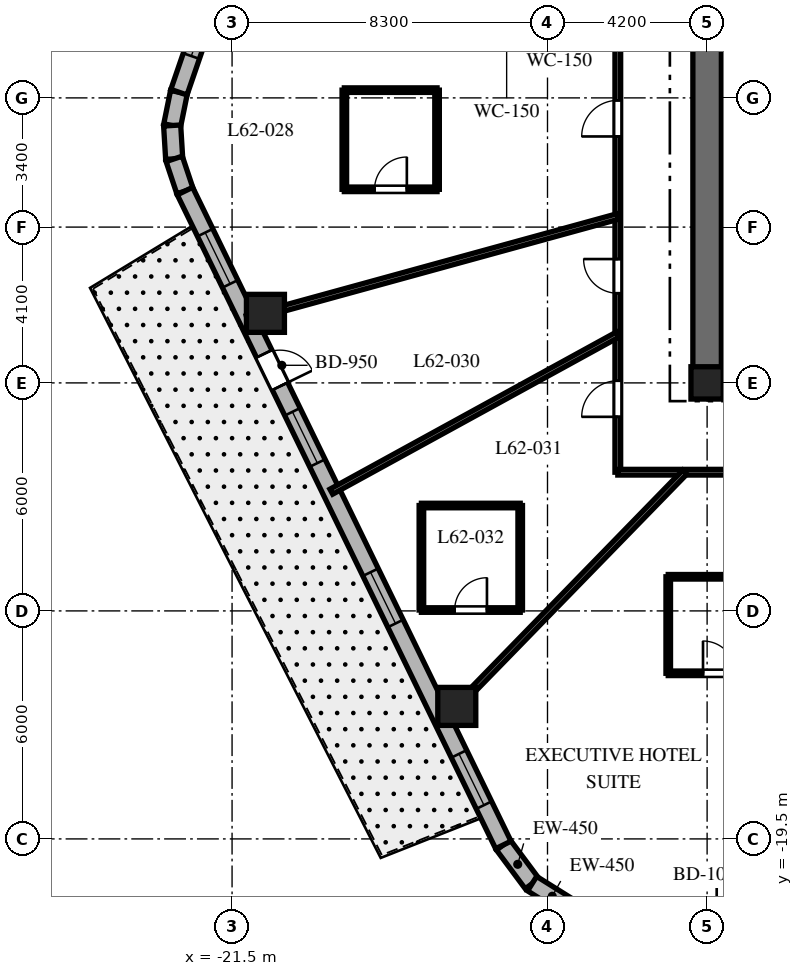
"""IFC4 building model, lengths in metres.
Left out: names, types, materials, properties, quantities, classifications, styles, units other than length and angle.
Written with IfcOpenShell. Run it as: python <this file> out.ifc"""

import sys

from ifc_helpers import new_model, si_unit, direction, frame, frame_2d, origin, origin_2d, place, context, subcontext, project, spatial, rectangle, extrude, element, fill, save


model = new_model("IFC4")
c1 = context("Model", 3, precision=1e-05, world=origin(), true_north=direction((0.0, 1.0)))
c2 = subcontext(c1, "Body", "Model", "MODEL_VIEW")
j1 = project(units=[si_unit("LENGTHUNIT", "METRE"), si_unit("PLANEANGLEUNIT", "RADIAN")], contexts=[c1])
p1 = place(None, origin())
s1 = spatial("IfcSite", under=j1, at=p1, CompositionType="ELEMENT")
p2 = place(p1, origin())
s2 = spatial("IfcBuilding", under=s1, at=p2, CompositionType="ELEMENT")
p3 = place(p2, frame((0.0, 0.0, 248.3)))
s3 = spatial("IfcBuildingStorey", under=s2, at=p3, CompositionType="ELEMENT", Elevation=248.3)
p4 = place(p3, frame((-9.375, -7.5, 0.0), z_axis=(0.0, 0.0, 1.0), x_axis=(1.0, 0.0, 0.0)))
e1 = element("IfcWall", 1, at=p4, inside=s3, PredefinedType="SHEAR", context=c2, shape_type="SweptSolid", body=[
    extrude(rectangle(XDim=18.75, YDim=0.75, at=frame_2d((9.375, 0.0))), origin(), (0.0, 0.0, 1.0), 3.8),
])
p5 = place(p4, frame((9.425, 0.0, 0.0)))
e2 = element("IfcOpeningElement", 2, at=p5, cuts=e1, PredefinedType="OPENING", context=c2, shape_type="SweptSolid", body=[
    extrude(rectangle(XDim=1.0, YDim=2.15, at=frame_2d((0.5, 1.075))), frame((0.0, 0.385, 0.0), z_axis=(0.0, -1.0, 0.0), x_axis=(1.0, 0.0, 0.0)), (0.0, 0.0, 1.0), 0.77),
])
p6 = place(p3, frame((-9.0, -7.125, 0.0), z_axis=(0.0, 0.0, 1.0), x_axis=(0.0, 1.0, 0.0)))
e3 = element("IfcWall", 3, at=p6, inside=s3, PredefinedType="SHEAR", context=c2, shape_type="SweptSolid", body=[
    extrude(rectangle(XDim=14.25, YDim=0.75, at=frame_2d((7.125, 0.0))), origin(), (0.0, 0.0, 1.0), 3.8),
])
p7 = place(p6, frame((10.25, 0.0, 0.0)))
e4 = element("IfcOpeningElement", 4, at=p7, cuts=e3, PredefinedType="OPENING", context=c2, shape_type="SweptSolid", body=[
    extrude(rectangle(XDim=1.05, YDim=2.15, at=frame_2d((0.525, 1.075))), frame((0.0, 0.385, 0.0), z_axis=(0.0, -1.0, 0.0), x_axis=(1.0, 0.0, 0.0)), (0.0, 0.0, 1.0), 0.77),
])
p8 = place(p3, frame((-9.0, -7.5, 0.0), z_axis=(0.0, 0.0, 1.0), x_axis=(1.0, 0.0, 0.0)))
e5 = element("IfcColumn", 5, at=p8, inside=s3, PredefinedType="COLUMN", context=c2, shape_type="SweptSolid", body=[
    extrude(rectangle(XDim=0.85, YDim=0.85, at=origin_2d()), origin(), (0.0, 0.0, 1.0), 3.8),
])
for number, where, z_axis, x_axis in (
    (6, (-20.622, -5.67, 0.0), (0.0, 0.0, 1.0), (1.0, 0.0, 0.0)),
    (7, (-15.587, -16.013, 0.0), (0.0, 0.0, 1.0), (1.0, 0.0, 0.0)),
):
    element("IfcColumn", number, at=place(p3, frame(where, z_axis=z_axis, x_axis=x_axis)), inside=s3, PredefinedType="COLUMN", context=c2, shape_type="SweptSolid", body=[
        extrude(rectangle(XDim=1.0, YDim=1.0, at=origin_2d()), origin(), (0.0, 0.0, 1.0), 3.8),
    ])
p9 = place(p3, frame((-14.362, -19.658, 0.0), z_axis=(0.0, 0.0, 1.0), x_axis=(0.596642462792, -0.80250717853, 0.0)))
e8 = element("IfcWall", 8, at=p9, inside=s3, PredefinedType="SOLIDWALL", context=c2, shape_type="SweptSolid", body=[
    extrude(rectangle(XDim=1.27, YDim=0.45, at=frame_2d((0.635, 0.0))), origin(), (0.0, 0.0, 1.0), 3.5),
])
p10 = place(p3, frame((-13.604, -20.678, 0.0), z_axis=(0.0, 0.0, 1.0), x_axis=(0.847910404124, -0.53013955387, 0.0)))
e9 = element("IfcWall", 9, at=p10, inside=s3, PredefinedType="SOLIDWALL", context=c2, shape_type="SweptSolid", body=[
    extrude(rectangle(XDim=1.249, YDim=0.45, at=frame_2d((0.624, 0.0))), origin(), (0.0, 0.0, 1.0), 3.5),
])
p11 = place(p3, frame((-22.898, 0.15, 0.0), z_axis=(0.0, 0.0, 1.0), x_axis=(-0.199055826889, -0.979988151858, 0.0)))
e10 = element("IfcWall", 10, at=p11, inside=s3, PredefinedType="SOLIDWALL", context=c2, shape_type="SweptSolid", body=[
    extrude(rectangle(XDim=0.894, YDim=0.45, at=frame_2d((0.447, 0.0))), origin(), (0.0, 0.0, 1.0), 3.5),
])
p12 = place(p3, frame((-23.076, -0.727, 0.0), z_axis=(0.0, 0.0, 1.0), x_axis=(0.060805222108, -0.998149650586, 0.0)))
e11 = element("IfcWall", 11, at=p12, inside=s3, PredefinedType="SOLIDWALL", context=c2, shape_type="SweptSolid", body=[
    extrude(rectangle(XDim=0.879, YDim=0.45, at=frame_2d((0.44, 0.0))), origin(), (0.0, 0.0, 1.0), 3.5),
])
p13 = place(p3, frame((-23.023, -1.604, 0.0), z_axis=(0.0, 0.0, 1.0), x_axis=(0.316801227695, -0.948491951537, 0.0)))
e12 = element("IfcWall", 12, at=p13, inside=s3, PredefinedType="SOLIDWALL", context=c2, shape_type="SweptSolid", body=[
    extrude(rectangle(XDim=0.894, YDim=0.45, at=frame_2d((0.447, 0.0))), origin(), (0.0, 0.0, 1.0), 3.5),
])
p14 = place(p3, frame((-16.324, 19.275, 0.0), z_axis=(0.0, 0.0, 1.0), x_axis=(-0.325083142304, -0.945685439557, 0.0)))
e13 = element("IfcWall", 13, at=p14, inside=s3, PredefinedType="SOLIDWALL", context=c2, shape_type="SweptSolid", body=[
    extrude(rectangle(XDim=20.224, YDim=0.45, at=frame_2d((10.112, 0.0))), origin(), (0.0, 0.0, 1.0), 3.5),
])
p15 = place(p14, frame((0.953, 0.0, 0.8)))
e14 = element("IfcOpeningElement", 14, at=p15, cuts=e13, PredefinedType="OPENING", context=c2, shape_type="SweptSolid", body=[
    extrude(rectangle(XDim=2.1, YDim=1.85, at=frame_2d((1.05, 0.925))), frame((0.0, 0.235, 0.0), z_axis=(0.0, -1.0, 0.0), x_axis=(1.0, 0.0, 0.0)), (0.0, 0.0, 1.0), 0.47),
])
p16 = place(p14, frame((6.268, 0.0, 0.8)))
e15 = element("IfcOpeningElement", 15, at=p16, cuts=e13, PredefinedType="OPENING", context=c2, shape_type="SweptSolid", body=[
    extrude(rectangle(XDim=2.1, YDim=1.85, at=frame_2d((1.05, 0.925))), frame((0.0, 0.235, 0.0), z_axis=(0.0, -1.0, 0.0), x_axis=(1.0, 0.0, 0.0)), (0.0, 0.0, 1.0), 0.47),
])
p17 = place(p14, frame((11.95, 0.0, 0.8)))
e16 = element("IfcOpeningElement", 16, at=p17, cuts=e13, PredefinedType="OPENING", context=c2, shape_type="SweptSolid", body=[
    extrude(rectangle(XDim=2.1, YDim=1.85, at=frame_2d((1.05, 0.925))), frame((0.0, 0.235, 0.0), z_axis=(0.0, -1.0, 0.0), x_axis=(1.0, 0.0, 0.0)), (0.0, 0.0, 1.0), 0.47),
])
p18 = place(p14, frame((17.118, 0.0, 0.8)))
e17 = element("IfcOpeningElement", 17, at=p18, cuts=e13, PredefinedType="OPENING", context=c2, shape_type="SweptSolid", body=[
    extrude(rectangle(XDim=2.1, YDim=1.85, at=frame_2d((1.05, 0.925))), frame((0.0, 0.235, 0.0), z_axis=(0.0, -1.0, 0.0), x_axis=(1.0, 0.0, 0.0)), (0.0, 0.0, 1.0), 0.47),
])
p19 = place(p3, frame((-22.74, -2.452, 0.0), z_axis=(0.0, 0.0, 1.0), x_axis=(0.437753424814, -0.899095066755, 0.0)))
e18 = element("IfcWall", 18, at=p19, inside=s3, PredefinedType="SOLIDWALL", context=c2, shape_type="SweptSolid", body=[
    extrude(rectangle(XDim=19.137, YDim=0.45, at=frame_2d((9.569, 0.0))), origin(), (0.0, 0.0, 1.0), 3.5),
])
p20 = place(p19, frame((4.763, 0.0, 0.0)))
e19 = element("IfcOpeningElement", 19, at=p20, cuts=e18, PredefinedType="OPENING", context=c2, shape_type="SweptSolid", body=[
    extrude(rectangle(XDim=0.95, YDim=2.15, at=frame_2d((0.475, 1.075))), frame((0.0, 0.235, 0.0), z_axis=(0.0, -1.0, 0.0), x_axis=(1.0, 0.0, 0.0)), (0.0, 0.0, 1.0), 0.47),
])
p21 = place(p19, frame((1.216, 0.0, 0.8)))
e20 = element("IfcOpeningElement", 20, at=p21, cuts=e18, PredefinedType="OPENING", context=c2, shape_type="SweptSolid", body=[
    extrude(rectangle(XDim=1.5, YDim=1.8, at=frame_2d((0.75, 0.9))), frame((0.0, 0.235, 0.0), z_axis=(0.0, -1.0, 0.0), x_axis=(1.0, 0.0, 0.0)), (0.0, 0.0, 1.0), 0.47),
])
p22 = place(p19, frame((6.461, 0.0, 0.8)))
e21 = element("IfcOpeningElement", 21, at=p22, cuts=e18, PredefinedType="OPENING", context=c2, shape_type="SweptSolid", body=[
    extrude(rectangle(XDim=1.5, YDim=1.8, at=frame_2d((0.75, 0.9))), frame((0.0, 0.235, 0.0), z_axis=(0.0, -1.0, 0.0), x_axis=(1.0, 0.0, 0.0)), (0.0, 0.0, 1.0), 0.47),
])
p23 = place(p19, frame((11.156, 0.0, 0.8)))
e22 = element("IfcOpeningElement", 22, at=p23, cuts=e18, PredefinedType="OPENING", context=c2, shape_type="SweptSolid", body=[
    extrude(rectangle(XDim=1.5, YDim=1.8, at=frame_2d((0.75, 0.9))), frame((0.0, 0.235, 0.0), z_axis=(0.0, -1.0, 0.0), x_axis=(1.0, 0.0, 0.0)), (0.0, 0.0, 1.0), 0.47),
])
p24 = place(p19, frame((16.473, 0.0, 0.8)))
e23 = element("IfcOpeningElement", 23, at=p24, cuts=e18, PredefinedType="OPENING", context=c2, shape_type="SweptSolid", body=[
    extrude(rectangle(XDim=1.5, YDim=1.8, at=frame_2d((0.75, 0.9))), frame((0.0, 0.235, 0.0), z_axis=(0.0, -1.0, 0.0), x_axis=(1.0, 0.0, 0.0)), (0.0, 0.0, 1.0), 0.47),
])
p25 = place(p3, frame((-11.35, -9.85, 0.0), z_axis=(0.0, 0.0, 1.0), x_axis=(0.0, 1.0, 0.0)))
e24 = element("IfcWall", 24, at=p25, inside=s3, PredefinedType="PARTITIONING", context=c2, shape_type="SweptSolid", body=[
    extrude(rectangle(XDim=12.4, YDim=0.15, at=frame_2d((6.2, 0.0))), origin(), (0.0, 0.0, 1.0), 2.99),
])
p26 = place(p25, frame((8.835, 0.0, 0.0)))
e25 = element("IfcOpeningElement", 25, at=p26, cuts=e24, PredefinedType="OPENING", context=c2, shape_type="SweptSolid", body=[
    extrude(rectangle(XDim=0.95, YDim=2.03, at=frame_2d((0.475, 1.015))), frame((0.0, 0.085, 0.0), z_axis=(0.0, -1.0, 0.0), x_axis=(1.0, 0.0, 0.0)), (0.0, 0.0, 1.0), 0.17),
])
p27 = place(p25, frame((4.709, 0.0, 0.0)))
e26 = element("IfcOpeningElement", 26, at=p27, cuts=e24, PredefinedType="OPENING", context=c2, shape_type="SweptSolid", body=[
    extrude(rectangle(XDim=0.9, YDim=2.03, at=frame_2d((0.45, 1.015))), frame((0.0, 0.085, 0.0), z_axis=(0.0, -1.0, 0.0), x_axis=(1.0, 0.0, 0.0)), (0.0, 0.0, 1.0), 0.17),
])
p28 = place(p25, frame((1.457, 0.0, 0.0)))
e27 = element("IfcOpeningElement", 27, at=p28, cuts=e24, PredefinedType="OPENING", context=c2, shape_type="SweptSolid", body=[
    extrude(rectangle(XDim=0.95, YDim=2.03, at=frame_2d((0.475, 1.015))), frame((0.0, 0.085, 0.0), z_axis=(0.0, -1.0, 0.0), x_axis=(1.0, 0.0, 0.0)), (0.0, 0.0, 1.0), 0.17),
])
p29 = place(p3, frame((-0.92, -9.85, 0.0), z_axis=(0.0, 0.0, 1.0), x_axis=(-1.0, 0.0, 0.0)))
e28 = element("IfcWall", 28, at=p29, inside=s3, PredefinedType="PARTITIONING", context=c2, shape_type="SweptSolid", body=[
    extrude(rectangle(XDim=10.43, YDim=0.15, at=frame_2d((5.215, 0.0))), origin(), (0.0, 0.0, 1.0), 2.99),
])
p30 = place(p29, frame((4.949, 0.0, 0.0)))
e29 = element("IfcOpeningElement", 29, at=p30, cuts=e28, PredefinedType="OPENING", context=c2, shape_type="SweptSolid", body=[
    extrude(rectangle(XDim=0.95, YDim=2.03, at=frame_2d((0.475, 1.015))), frame((0.0, 0.085, 0.0), z_axis=(0.0, -1.0, 0.0), x_axis=(1.0, 0.0, 0.0)), (0.0, 0.0, 1.0), 0.17),
])
p31 = place(p3, frame((-11.35, -3.121, 0.0), z_axis=(0.0, 0.0, 1.0), x_axis=(-0.964212793822, -0.265129568758, 0.0)))
e30 = element("IfcWall", 30, at=p31, inside=s3, PredefinedType="PARTITIONING", context=c2, shape_type="SweptSolid", body=[
    extrude(rectangle(XDim=10.12, YDim=0.15, at=frame_2d((5.06, 0.0))), origin(), (0.0, 0.0, 1.0), 2.74),
])
p32 = place(p3, frame((-11.35, -6.227, 0.0), z_axis=(0.0, 0.0, 1.0), x_axis=(-0.876723190824, -0.480995266786, 0.0)))
e31 = element("IfcWall", 31, at=p32, inside=s3, PredefinedType="PARTITIONING", context=c2, shape_type="SweptSolid", body=[
    extrude(rectangle(XDim=8.598, YDim=0.15, at=frame_2d((4.299, 0.0))), origin(), (0.0, 0.0, 1.0), 2.74),
])
p33 = place(p3, frame((-9.588, -9.85, 0.0), z_axis=(0.0, 0.0, 1.0), x_axis=(-0.697519469595, -0.716565830567, 0.0)))
e32 = element("IfcWall", 32, at=p33, inside=s3, PredefinedType="PARTITIONING", context=c2, shape_type="SweptSolid", body=[
    extrude(rectangle(XDim=9.126, YDim=0.15, at=frame_2d((4.563, 0.0))), origin(), (0.0, 0.0, 1.0), 2.74),
])
p34 = place(p3, frame((-18.546, -2.406, 0.0), z_axis=(0.0, 0.0, 1.0), x_axis=(1.0, 0.0, 0.0)))
e33 = element("IfcWall", 33, at=p34, inside=s3, PredefinedType="PARTITIONING", context=c2, shape_type="SweptSolid", body=[
    extrude(rectangle(XDim=2.44, YDim=0.12, at=frame_2d((1.22, 0.0))), origin(), (0.0, 0.0, 1.0), 2.94),
])
p35 = place(p34, frame((0.795, 0.0, 0.0)))
e34 = element("IfcOpeningElement", 34, at=p35, cuts=e33, PredefinedType="OPENING", context=c2, shape_type="SweptSolid", body=[
    extrude(rectangle(XDim=0.85, YDim=2.03, at=frame_2d((0.425, 1.015))), frame((0.0, 0.07, 0.0), z_axis=(0.0, -1.0, 0.0), x_axis=(1.0, 0.0, 0.0)), (0.0, 0.0, 1.0), 0.14),
])
p36 = place(p3, frame((-16.106, -2.406, 0.0), z_axis=(0.0, 0.0, 1.0), x_axis=(0.0, 1.0, 0.0)))
e35 = element("IfcWall", 35, at=p36, inside=s3, PredefinedType="PARTITIONING", context=c2, shape_type="SweptSolid", body=[
    extrude(rectangle(XDim=2.61, YDim=0.12, at=frame_2d((1.305, 0.0))), origin(), (0.0, 0.0, 1.0), 3.5),
])
p37 = place(p3, frame((-16.106, 0.204, 0.0), z_axis=(0.0, 0.0, 1.0), x_axis=(-1.0, 0.0, 0.0)))
e36 = element("IfcWall", 36, at=p37, inside=s3, PredefinedType="PARTITIONING", context=c2, shape_type="SweptSolid", body=[
    extrude(rectangle(XDim=2.44, YDim=0.12, at=frame_2d((1.22, 0.0))), origin(), (0.0, 0.0, 1.0), 2.94),
])
p38 = place(p3, frame((-18.546, 0.204, 0.0), z_axis=(0.0, 0.0, 1.0), x_axis=(0.0, -1.0, 0.0)))
e37 = element("IfcWall", 37, at=p38, inside=s3, PredefinedType="PARTITIONING", context=c2, shape_type="SweptSolid", body=[
    extrude(rectangle(XDim=2.61, YDim=0.12, at=frame_2d((1.305, 0.0))), origin(), (0.0, 0.0, 1.0), 3.5),
])
p39 = place(p3, frame((-16.518, -13.477, 0.0), z_axis=(0.0, 0.0, 1.0), x_axis=(1.0, 0.0, 0.0)))
e38 = element("IfcWall", 38, at=p39, inside=s3, PredefinedType="PARTITIONING", context=c2, shape_type="SweptSolid", body=[
    extrude(rectangle(XDim=2.6, YDim=0.12, at=frame_2d((1.3, 0.0))), origin(), (0.0, 0.0, 1.0), 3.5),
])
p40 = place(p39, frame((0.875, 0.0, 0.0)))
e39 = element("IfcOpeningElement", 39, at=p40, cuts=e38, PredefinedType="OPENING", context=c2, shape_type="SweptSolid", body=[
    extrude(rectangle(XDim=0.85, YDim=2.03, at=frame_2d((0.425, 1.015))), frame((0.0, 0.07, 0.0), z_axis=(0.0, -1.0, 0.0), x_axis=(1.0, 0.0, 0.0)), (0.0, 0.0, 1.0), 0.14),
])
p41 = place(p3, frame((-13.918, -13.477, 0.0), z_axis=(0.0, 0.0, 1.0), x_axis=(0.0, 1.0, 0.0)))
e40 = element("IfcWall", 40, at=p41, inside=s3, PredefinedType="PARTITIONING", context=c2, shape_type="SweptSolid", body=[
    extrude(rectangle(XDim=2.75, YDim=0.12, at=frame_2d((1.375, 0.0))), origin(), (0.0, 0.0, 1.0), 3.026),
])
p42 = place(p3, frame((-13.918, -10.727, 0.0), z_axis=(0.0, 0.0, 1.0), x_axis=(-1.0, 0.0, 0.0)))
e41 = element("IfcWall", 41, at=p42, inside=s3, PredefinedType="PARTITIONING", context=c2, shape_type="SweptSolid", body=[
    extrude(rectangle(XDim=2.6, YDim=0.12, at=frame_2d((1.3, 0.0))), origin(), (0.0, 0.0, 1.0), 3.026),
])
p43 = place(p3, frame((-16.518, -10.727, 0.0), z_axis=(0.0, 0.0, 1.0), x_axis=(0.0, -1.0, 0.0)))
e42 = element("IfcWall", 42, at=p43, inside=s3, PredefinedType="PARTITIONING", context=c2, shape_type="SweptSolid", body=[
    extrude(rectangle(XDim=2.75, YDim=0.12, at=frame_2d((1.375, 0.0))), origin(), (0.0, 0.0, 1.0), 3.5),
])
p44 = place(p3, frame((-10.023, -15.142, 0.0), z_axis=(0.0, 0.0, 1.0), x_axis=(1.0, 0.0, 0.0)))
e43 = element("IfcWall", 43, at=p44, inside=s3, PredefinedType="PARTITIONING", context=c2, shape_type="SweptSolid", body=[
    extrude(rectangle(XDim=2.68, YDim=0.12, at=frame_2d((1.34, 0.0))), origin(), (0.0, 0.0, 1.0), 3.072),
])
p45 = place(p44, frame((0.915, 0.0, 0.0)))
e44 = element("IfcOpeningElement", 44, at=p45, cuts=e43, PredefinedType="OPENING", context=c2, shape_type="SweptSolid", body=[
    extrude(rectangle(XDim=0.85, YDim=2.03, at=frame_2d((0.425, 1.015))), frame((0.0, 0.07, 0.0), z_axis=(0.0, -1.0, 0.0), x_axis=(1.0, 0.0, 0.0)), (0.0, 0.0, 1.0), 0.14),
])
p46 = place(p3, frame((-7.343, -12.602, 0.0), z_axis=(0.0, 0.0, 1.0), x_axis=(-1.0, 0.0, 0.0)))
e45 = element("IfcWall", 45, at=p46, inside=s3, PredefinedType="PARTITIONING", context=c2, shape_type="SweptSolid", body=[
    extrude(rectangle(XDim=2.68, YDim=0.12, at=frame_2d((1.34, 0.0))), origin(), (0.0, 0.0, 1.0), 2.94),
])
p47 = place(p3, frame((-10.023, -12.602, 0.0), z_axis=(0.0, 0.0, 1.0), x_axis=(0.0, -1.0, 0.0)))
e46 = element("IfcWall", 46, at=p47, inside=s3, PredefinedType="PARTITIONING", context=c2, shape_type="SweptSolid", body=[
    extrude(rectangle(XDim=2.54, YDim=0.12, at=frame_2d((1.27, 0.0))), origin(), (0.0, 0.0, 1.0), 3.072),
])
p48 = place(p18, origin())
e47 = element("IfcWindow", 47, at=p48, inside=s3, PartitioningType="SINGLE_PANEL", PredefinedType="WINDOW", context=c2, shape_type="SweptSolid", body=[
    extrude(rectangle(XDim=2.1, YDim=1.85, at=frame_2d((1.05, 0.925))), frame((0.0, 0.03, 0.0), z_axis=(0.0, -1.0, 0.0), x_axis=(1.0, 0.0, 0.0)), (0.0, 0.0, 1.0), 0.06),
])
fill(e17, e47)
p49 = place(p20, origin())
e48 = element("IfcDoor", 48, at=p49, inside=s3, OperationType="SINGLE_SWING_RIGHT", PredefinedType="DOOR", context=c2, shape_type="SweptSolid", body=[
    extrude(rectangle(XDim=0.95, YDim=2.15, at=frame_2d((0.475, 1.075))), frame((0.0, 0.025, 0.0), z_axis=(0.0, -1.0, 0.0), x_axis=(1.0, 0.0, 0.0)), (0.0, 0.0, 1.0), 0.05),
])
fill(e19, e48)
p50 = place(p21, origin())
e49 = element("IfcWindow", 49, at=p50, inside=s3, PartitioningType="SINGLE_PANEL", PredefinedType="WINDOW", context=c2, shape_type="SweptSolid", body=[
    extrude(rectangle(XDim=1.5, YDim=1.8, at=frame_2d((0.75, 0.9))), frame((0.0, 0.03, 0.0), z_axis=(0.0, -1.0, 0.0), x_axis=(1.0, 0.0, 0.0)), (0.0, 0.0, 1.0), 0.06),
])
fill(e20, e49)
p51 = place(p22, origin())
e50 = element("IfcWindow", 50, at=p51, inside=s3, PartitioningType="SINGLE_PANEL", PredefinedType="WINDOW", context=c2, shape_type="SweptSolid", body=[
    extrude(rectangle(XDim=1.5, YDim=1.8, at=frame_2d((0.75, 0.9))), frame((0.0, 0.03, 0.0), z_axis=(0.0, -1.0, 0.0), x_axis=(1.0, 0.0, 0.0)), (0.0, 0.0, 1.0), 0.06),
])
fill(e21, e50)
p52 = place(p23, origin())
e51 = element("IfcWindow", 51, at=p52, inside=s3, PartitioningType="SINGLE_PANEL", PredefinedType="WINDOW", context=c2, shape_type="SweptSolid", body=[
    extrude(rectangle(XDim=1.5, YDim=1.8, at=frame_2d((0.75, 0.9))), frame((0.0, 0.03, 0.0), z_axis=(0.0, -1.0, 0.0), x_axis=(1.0, 0.0, 0.0)), (0.0, 0.0, 1.0), 0.06),
])
fill(e22, e51)
p53 = place(p24, origin())
e52 = element("IfcWindow", 52, at=p53, inside=s3, PartitioningType="SINGLE_PANEL", PredefinedType="WINDOW", context=c2, shape_type="SweptSolid", body=[
    extrude(rectangle(XDim=1.5, YDim=1.8, at=frame_2d((0.75, 0.9))), frame((0.0, 0.03, 0.0), z_axis=(0.0, -1.0, 0.0), x_axis=(1.0, 0.0, 0.0)), (0.0, 0.0, 1.0), 0.06),
])
fill(e23, e52)
p54 = place(p26, origin())
e53 = element("IfcDoor", 53, at=p54, inside=s3, OperationType="SINGLE_SWING_LEFT", PredefinedType="DOOR", context=c2, shape_type="SweptSolid", body=[
    extrude(rectangle(XDim=0.95, YDim=2.03, at=frame_2d((0.475, 1.015))), frame((0.0, 0.025, 0.0), z_axis=(0.0, -1.0, 0.0), x_axis=(1.0, 0.0, 0.0)), (0.0, 0.0, 1.0), 0.05),
])
fill(e25, e53)
p55 = place(p35, origin())
e54 = element("IfcDoor", 54, at=p55, inside=s3, OperationType="SINGLE_SWING_RIGHT", PredefinedType="DOOR", context=c2, shape_type="SweptSolid", body=[
    extrude(rectangle(XDim=0.85, YDim=2.03, at=frame_2d((0.425, 1.015))), frame((0.0, 0.025, 0.0), z_axis=(0.0, -1.0, 0.0), x_axis=(1.0, 0.0, 0.0)), (0.0, 0.0, 1.0), 0.05),
])
fill(e34, e54)
p56 = place(p27, origin())
e55 = element("IfcDoor", 55, at=p56, inside=s3, OperationType="SINGLE_SWING_RIGHT", PredefinedType="DOOR", context=c2, shape_type="SweptSolid", body=[
    extrude(rectangle(XDim=0.9, YDim=2.03, at=frame_2d((0.45, 1.015))), frame((0.0, 0.025, 0.0), z_axis=(0.0, -1.0, 0.0), x_axis=(1.0, 0.0, 0.0)), (0.0, 0.0, 1.0), 0.05),
])
fill(e26, e55)
p57 = place(p28, origin())
e56 = element("IfcDoor", 56, at=p57, inside=s3, OperationType="SINGLE_SWING_LEFT", PredefinedType="DOOR", context=c2, shape_type="SweptSolid", body=[
    extrude(rectangle(XDim=0.95, YDim=2.03, at=frame_2d((0.475, 1.015))), frame((0.0, 0.025, 0.0), z_axis=(0.0, -1.0, 0.0), x_axis=(1.0, 0.0, 0.0)), (0.0, 0.0, 1.0), 0.05),
])
fill(e27, e56)
p58 = place(p40, origin())
e57 = element("IfcDoor", 57, at=p58, inside=s3, OperationType="SINGLE_SWING_RIGHT", PredefinedType="DOOR", context=c2, shape_type="SweptSolid", body=[
    extrude(rectangle(XDim=0.85, YDim=2.03, at=frame_2d((0.425, 1.015))), frame((0.0, 0.025, 0.0), z_axis=(0.0, -1.0, 0.0), x_axis=(1.0, 0.0, 0.0)), (0.0, 0.0, 1.0), 0.05),
])
fill(e39, e57)
p59 = place(p45, origin())
e58 = element("IfcDoor", 58, at=p59, inside=s3, OperationType="SINGLE_SWING_LEFT", PredefinedType="DOOR", context=c2, shape_type="SweptSolid", body=[
    extrude(rectangle(XDim=0.85, YDim=2.03, at=frame_2d((0.425, 1.015))), frame((0.0, 0.025, 0.0), z_axis=(0.0, -1.0, 0.0), x_axis=(1.0, 0.0, 0.0)), (0.0, 0.0, 1.0), 0.05),
])
fill(e44, e58)
save(model, sys.argv[1])
